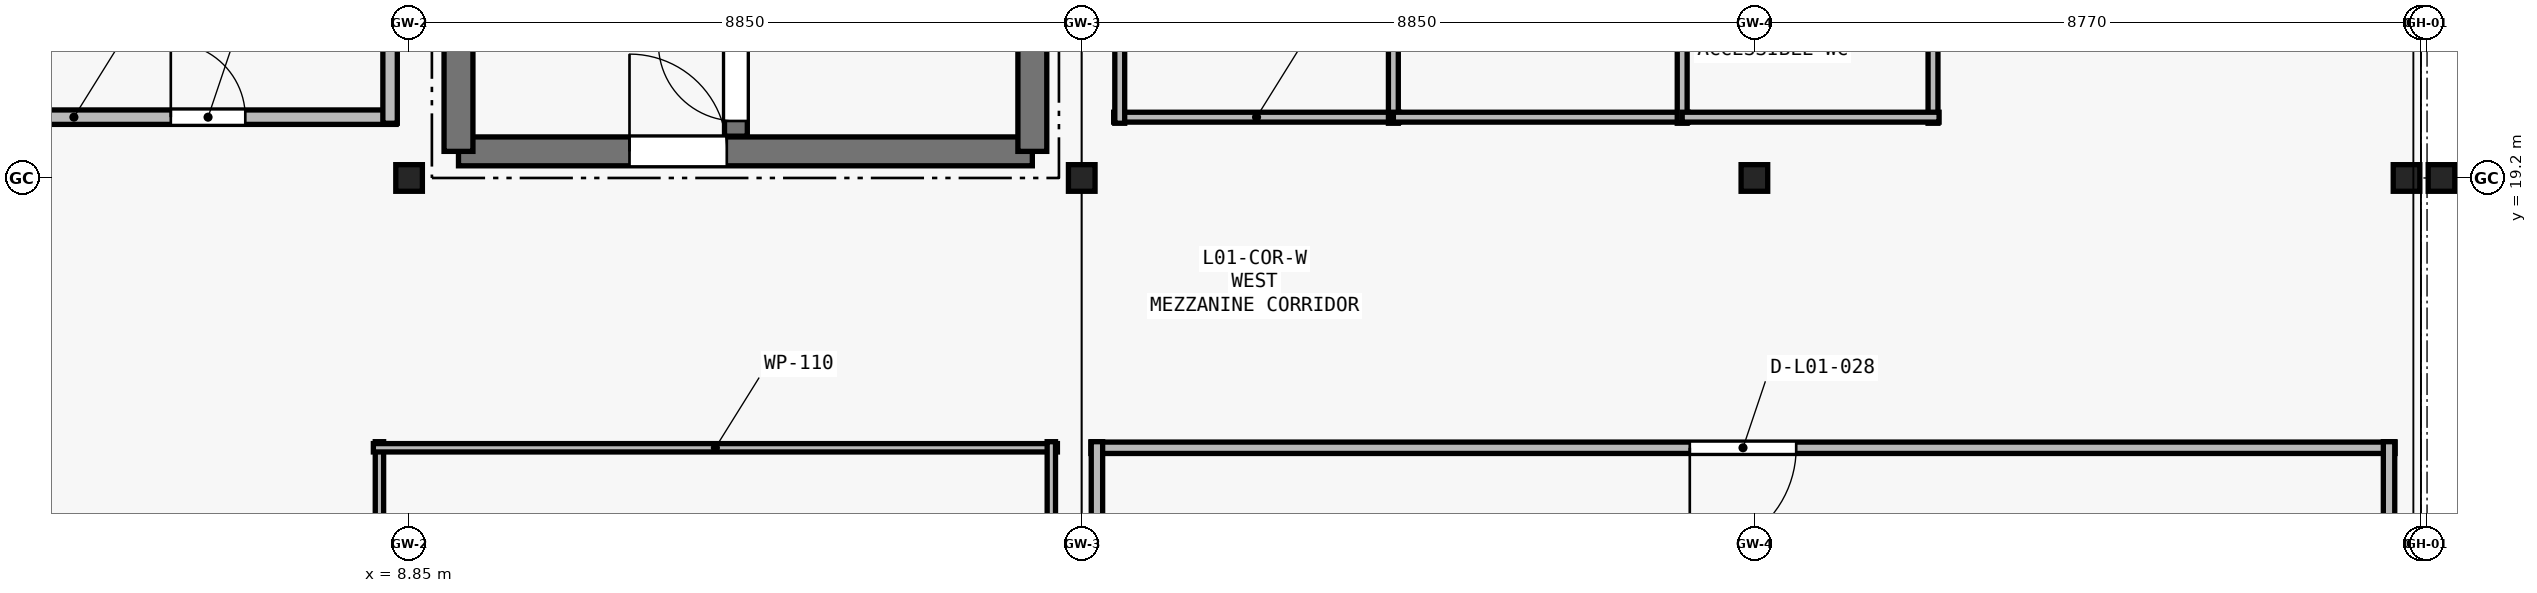
"""IFC4 building model, lengths in metres.
Left out: names, types, materials, properties, quantities, classifications, styles, units other than length and angle.
Written with IfcOpenShell. Run it as: python <this file> out.ifc"""

import sys

from ifc_helpers import new_model, si_unit, direction, frame, frame_2d, origin, origin_2d, place, context, subcontext, project, spatial, rectangle, i_section, extrude, element, fill, save


model = new_model("IFC4")
c1 = context("Model", 3, precision=1e-05, world=origin(), true_north=direction((0.0, 1.0)))
c2 = subcontext(c1, "Body", "Model", "MODEL_VIEW")
j1 = project(units=[si_unit("LENGTHUNIT", "METRE"), si_unit("PLANEANGLEUNIT", "RADIAN")], contexts=[c1])
p1 = place(None, origin())
s1 = spatial("IfcSite", under=j1, at=p1, CompositionType="ELEMENT")
p2 = place(p1, origin())
s2 = spatial("IfcBuilding", under=s1, at=p2, CompositionType="ELEMENT")
p3 = place(p2, frame((0.0, 0.0, 6.0)))
s3 = spatial("IfcBuildingStorey", under=s2, at=p3, CompositionType="ELEMENT", Elevation=6.0)
for number, where, z_axis, x_axis in (
    (1, (8.85, 19.2, 0.0), (0.0, 0.0, 1.0), (1.0, 0.0, 0.0)),
    (2, (17.7, 19.2, 0.0), (0.0, 0.0, 1.0), (1.0, 0.0, 0.0)),
    (3, (26.55, 19.2, 0.0), (0.0, 0.0, 1.0), (1.0, 0.0, 0.0)),
    (4, (35.13, 19.2, 0.0), (0.0, 0.0, 1.0), (1.0, 0.0, 0.0)),
    (5, (35.59, 19.2, 0.0), (0.0, 0.0, 1.0), (1.0, 0.0, 0.0)),
):
    element("IfcColumn", number, at=place(p3, frame(where, z_axis=z_axis, x_axis=x_axis)), inside=s3, PredefinedType="COLUMN", context=c2, shape_type="SweptSolid", body=[
        extrude(i_section(OverallWidth=0.35, OverallDepth=0.35, WebThickness=0.012, FlangeThickness=0.019, FilletRadius=0.02, at=origin_2d()), origin(), (0.0, 0.0, 1.0), 4.8),
    ])
p4 = place(p3, frame((9.5, 19.55, 0.0), z_axis=(0.0, 0.0, 1.0), x_axis=(1.0, 0.0, 0.0)))
e6 = element("IfcWall", 6, at=p4, inside=s3, PredefinedType="SHEAR", context=c2, shape_type="SweptSolid", body=[
    extrude(rectangle(XDim=7.55, YDim=0.38, at=frame_2d((3.775, 0.0))), origin(), (0.0, 0.0, 1.0), 4.8),
])
p5 = place(p4, frame((2.25, 0.0, 0.0)))
e7 = element("IfcOpeningElement", 7, at=p5, cuts=e6, PredefinedType="OPENING", context=c2, shape_type="SweptSolid", body=[
    extrude(rectangle(XDim=1.28, YDim=2.15, at=frame_2d((0.64, 1.075))), frame((0.0, 0.2, 0.0), z_axis=(0.0, -1.0, 0.0), x_axis=(1.0, 0.0, 0.0)), (0.0, 0.0, 1.0), 0.4),
])
for number, where, z_axis, x_axis in (
    (8, (9.5, 28.35, 0.0), (0.0, 0.0, 1.0), (0.0, -1.0, 0.0)),
    (9, (17.05, 19.55, 0.0), (0.0, 0.0, 1.0), (0.0, 1.0, 0.0)),
):
    element("IfcWall", number, at=place(p3, frame(where, z_axis=z_axis, x_axis=x_axis)), inside=s3, PredefinedType="SHEAR", context=c2, shape_type="SweptSolid", body=[
        extrude(rectangle(XDim=8.8, YDim=0.38, at=frame_2d((4.4, 0.0))), origin(), (0.0, 0.0, 1.0), 4.8),
    ])
p6 = place(p3, frame((13.15, 19.75, 0.0), z_axis=(0.0, 0.0, 1.0), x_axis=(0.0, 1.0, 0.0)))
e10 = element("IfcWall", 10, at=p6, inside=s3, PredefinedType="SHEAR", context=c2, shape_type="SweptSolid", body=[
    extrude(rectangle(XDim=8.4, YDim=0.3, at=frame_2d((4.2, 0.0))), origin(), (0.0, 0.0, 1.0), 4.8),
])
p7 = place(p6, frame((0.2, 0.0, 0.0)))
e11 = element("IfcOpeningElement", 11, at=p7, cuts=e10, PredefinedType="OPENING", context=c2, shape_type="SweptSolid", body=[
    extrude(rectangle(XDim=1.02, YDim=2.1, at=frame_2d((0.51, 1.05))), frame((0.0, 0.16, 0.0), z_axis=(0.0, -1.0, 0.0), x_axis=(1.0, 0.0, 0.0)), (0.0, 0.0, 1.0), 0.32),
])
p8 = place(p3, frame((18.12, 20.0, 0.0), z_axis=(0.0, 0.0, 1.0), x_axis=(1.0, 0.0, 0.0)))
e12 = element("IfcWall", 12, at=p8, inside=s3, PredefinedType="PARTITIONING", context=c2, shape_type="SweptSolid", body=[
    extrude(rectangle(XDim=3.76, YDim=0.13, at=frame_2d((1.88, 0.0))), origin(), (0.0, 0.0, 1.0), 4.32),
])
for number, where, z_axis, x_axis in (
    (13, (21.8, 19.92, 0.0), (0.0, 0.0, 1.0), (0.0, 1.0, 0.0)),
    (14, (18.2, 24.08, 0.0), (0.0, 0.0, 1.0), (0.0, -1.0, 0.0)),
):
    element("IfcWall", number, at=place(p3, frame(where, z_axis=z_axis, x_axis=x_axis)), inside=s3, PredefinedType="PARTITIONING", context=c2, shape_type="SweptSolid", body=[
        extrude(rectangle(XDim=4.16, YDim=0.13, at=frame_2d((2.08, 0.0))), origin(), (0.0, 0.0, 1.0), 4.32),
    ])
p9 = place(p3, frame((21.8, 20.0, 0.0), z_axis=(0.0, 0.0, 1.0), x_axis=(1.0, 0.0, 0.0)))
e15 = element("IfcWall", 15, at=p9, inside=s3, PredefinedType="PARTITIONING", context=c2, shape_type="SweptSolid", body=[
    extrude(rectangle(XDim=3.88, YDim=0.13, at=frame_2d((1.94, 0.0))), origin(), (0.0, 0.0, 1.0), 4.32),
])
p10 = place(p3, frame((25.6, 19.92, 0.0), z_axis=(0.0, 0.0, 1.0), x_axis=(0.0, 1.0, 0.0)))
e16 = element("IfcWall", 16, at=p10, inside=s3, PredefinedType="PARTITIONING", context=c2, shape_type="SweptSolid", body=[
    extrude(rectangle(XDim=4.16, YDim=0.13, at=frame_2d((2.08, 0.0))), origin(), (0.0, 0.0, 1.0), 4.32),
])
p11 = place(p3, frame((28.9, 19.92, 0.0), z_axis=(0.0, 0.0, 1.0), x_axis=(0.0, 1.0, 0.0)))
e17 = element("IfcWall", 17, at=p11, inside=s3, PredefinedType="PARTITIONING", context=c2, shape_type="SweptSolid", body=[
    extrude(rectangle(XDim=4.16, YDim=0.13, at=frame_2d((2.08, 0.0))), origin(), (0.0, 0.0, 1.0), 4.32),
])
p12 = place(p11, frame((1.22, 0.0, 0.0)))
e18 = element("IfcOpeningElement", 18, at=p12, cuts=e17, PredefinedType="OPENING", context=c2, shape_type="SweptSolid", body=[
    extrude(rectangle(XDim=1.72, YDim=2.32, at=frame_2d((0.86, 1.16))), frame((0.0, 0.075, 0.0), z_axis=(0.0, -1.0, 0.0), x_axis=(1.0, 0.0, 0.0)), (0.0, 0.0, 1.0), 0.15),
])
p13 = place(p3, frame((25.6, 20.0, 0.0), z_axis=(0.0, 0.0, 1.0), x_axis=(1.0, 0.0, 0.0)))
e19 = element("IfcWall", 19, at=p13, inside=s3, PredefinedType="PARTITIONING", context=c2, shape_type="SweptSolid", body=[
    extrude(rectangle(XDim=3.38, YDim=0.13, at=frame_2d((1.69, 0.0))), origin(), (0.0, 0.0, 1.0), 4.32),
])
p14 = place(p3, frame((8.46, 15.73, 0.0), z_axis=(0.0, 0.0, 1.0), x_axis=(0.0, -1.0, 0.0)))
e20 = element("IfcWall", 20, at=p14, inside=s3, PredefinedType="PARTITIONING", context=c2, shape_type="SweptSolid", body=[
    extrude(rectangle(XDim=15.53, YDim=0.11, at=frame_2d((7.765, 0.0))), origin(), (0.0, 0.0, 1.0), 4.32),
])
p15 = place(p14, frame((6.845, 0.0, 0.0)))
e21 = element("IfcOpeningElement", 21, at=p15, cuts=e20, PredefinedType="OPENING", context=c2, shape_type="SweptSolid", body=[
    extrude(rectangle(XDim=1.84, YDim=2.2, at=frame_2d((0.92, 1.1))), frame((0.0, 0.065, 0.0), z_axis=(0.0, -1.0, 0.0), x_axis=(1.0, 0.0, 0.0)), (0.0, 0.0, 1.0), 0.13),
])
p16 = place(p3, frame((17.38, 15.65, 0.0), z_axis=(0.0, 0.0, 1.0), x_axis=(-1.0, 0.0, 0.0)))
e22 = element("IfcWall", 22, at=p16, inside=s3, PredefinedType="PARTITIONING", context=c2, shape_type="SweptSolid", body=[
    extrude(rectangle(XDim=9.0, YDim=0.11, at=frame_2d((4.5, 0.0))), origin(), (0.0, 0.0, 1.0), 4.32),
])
p17 = place(p3, frame((17.3, 0.2, 0.0), z_axis=(0.0, 0.0, 1.0), x_axis=(0.0, 1.0, 0.0)))
e23 = element("IfcWall", 23, at=p17, inside=s3, PredefinedType="PARTITIONING", context=c2, shape_type="SweptSolid", body=[
    extrude(rectangle(XDim=15.53, YDim=0.11, at=frame_2d((7.765, 0.0))), origin(), (0.0, 0.0, 1.0), 4.32),
])
p18 = place(p3, frame((34.98, 15.65, 0.0), z_axis=(0.0, 0.0, 1.0), x_axis=(-1.0, 0.0, 0.0)))
e24 = element("IfcWall", 24, at=p18, inside=s3, PredefinedType="PARTITIONING", context=c2, shape_type="SweptSolid", body=[
    extrude(rectangle(XDim=17.16, YDim=0.15, at=frame_2d((8.58, 0.0))), origin(), (0.0, 0.0, 1.0), 4.32),
])
p19 = place(p18, frame((7.88, 0.0, 0.0)))
e25 = element("IfcOpeningElement", 25, at=p19, cuts=e24, PredefinedType="OPENING", context=c2, shape_type="SweptSolid", body=[
    extrude(rectangle(XDim=1.4, YDim=2.38, at=frame_2d((0.7, 1.19))), frame((0.0, 0.085, 0.0), z_axis=(0.0, -1.0, 0.0), x_axis=(1.0, 0.0, 0.0)), (0.0, 0.0, 1.0), 0.17),
])
for number, where, z_axis, x_axis in (
    (26, (17.9, 15.73, 0.0), (0.0, 0.0, 1.0), (0.0, -1.0, 0.0)),
    (27, (34.9, 0.2, 0.0), (0.0, 0.0, 1.0), (0.0, 1.0, 0.0)),
):
    element("IfcWall", number, at=place(p3, frame(where, z_axis=z_axis, x_axis=x_axis)), inside=s3, PredefinedType="PARTITIONING", context=c2, shape_type="SweptSolid", body=[
        extrude(rectangle(XDim=15.53, YDim=0.15, at=frame_2d((7.765, 0.0))), origin(), (0.0, 0.0, 1.0), 4.015),
    ])
p20 = place(p3, frame((0.2, 20.0, 0.0), z_axis=(0.0, 0.0, 1.0), x_axis=(1.0, 0.0, 0.0)))
e28 = element("IfcWall", 28, at=p20, inside=s3, PredefinedType="PARTITIONING", context=c2, shape_type="SweptSolid", body=[
    extrude(rectangle(XDim=8.48, YDim=0.19, at=frame_2d((4.24, 0.0))), origin(), (0.0, 0.0, 1.0), 4.32),
])
p21 = place(p20, frame((5.515, 0.0, 0.0)))
e29 = element("IfcOpeningElement", 29, at=p21, cuts=e28, PredefinedType="OPENING", context=c2, shape_type="SweptSolid", body=[
    extrude(rectangle(XDim=0.98, YDim=2.36, at=frame_2d((0.49, 1.18))), frame((0.0, 0.105, 0.0), z_axis=(0.0, -1.0, 0.0), x_axis=(1.0, 0.0, 0.0)), (0.0, 0.0, 1.0), 0.21),
])
p22 = place(p3, frame((8.6, 19.92, 0.0), z_axis=(0.0, 0.0, 1.0), x_axis=(0.0, 1.0, 0.0)))
e30 = element("IfcWall", 30, at=p22, inside=s3, PredefinedType="PARTITIONING", context=c2, shape_type="SweptSolid", body=[
    extrude(rectangle(XDim=15.66, YDim=0.19, at=frame_2d((7.83, 0.0))), origin(), (0.0, 0.0, 1.0), 4.015),
])
p23 = place(p5, origin())
e31 = element("IfcDoor", 31, at=p23, inside=s3, OperationType="SINGLE_SWING_LEFT", PredefinedType="DOOR", context=c2, shape_type="SweptSolid", body=[
    extrude(rectangle(XDim=1.28, YDim=2.15, at=frame_2d((0.64, 1.075))), frame((0.0, 0.025, 0.0), z_axis=(0.0, -1.0, 0.0), x_axis=(1.0, 0.0, 0.0)), (0.0, 0.0, 1.0), 0.05),
])
fill(e7, e31)
p24 = place(p7, origin())
e32 = element("IfcDoor", 32, at=p24, inside=s3, OperationType="SINGLE_SWING_RIGHT", PredefinedType="DOOR", context=c2, shape_type="SweptSolid", body=[
    extrude(rectangle(XDim=1.02, YDim=2.1, at=frame_2d((0.51, 1.05))), frame((0.0, 0.025, 0.0), z_axis=(0.0, -1.0, 0.0), x_axis=(1.0, 0.0, 0.0)), (0.0, 0.0, 1.0), 0.05),
])
fill(e11, e32)
p25 = place(p19, origin())
e33 = element("IfcDoor", 33, at=p25, inside=s3, OperationType="SINGLE_SWING_RIGHT", PredefinedType="DOOR", context=c2, shape_type="SweptSolid", body=[
    extrude(rectangle(XDim=1.4, YDim=2.38, at=frame_2d((0.7, 1.19))), frame((0.0, 0.025, 0.0), z_axis=(0.0, -1.0, 0.0), x_axis=(1.0, 0.0, 0.0)), (0.0, 0.0, 1.0), 0.05),
])
fill(e25, e33)
p26 = place(p21, origin())
e34 = element("IfcDoor", 34, at=p26, inside=s3, OperationType="SINGLE_SWING_LEFT", PredefinedType="DOOR", context=c2, shape_type="SweptSolid", body=[
    extrude(rectangle(XDim=0.98, YDim=2.36, at=frame_2d((0.49, 1.18))), frame((0.0, 0.025, 0.0), z_axis=(0.0, -1.0, 0.0), x_axis=(1.0, 0.0, 0.0)), (0.0, 0.0, 1.0), 0.05),
])
fill(e29, e34)
save(model, sys.argv[1])
